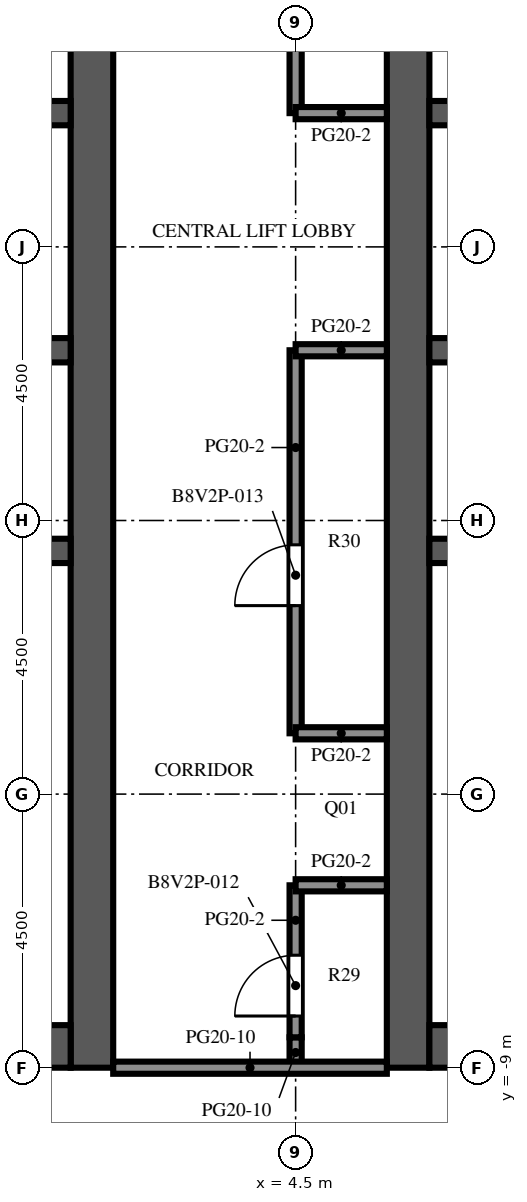
"""IFC4 building model, lengths in metres.
Left out: names, types, materials, properties, quantities, classifications, styles, units other than length and angle.
Written with IfcOpenShell. Run it as: python <this file> out.ifc"""

import sys

from ifc_helpers import new_model, si_unit, direction, frame, frame_2d, origin, place, context, subcontext, project, spatial, rectangle, extrude, element, fill, save


model = new_model("IFC4")
c1 = context("Model", 3, precision=1e-05, world=origin(), true_north=direction((0.0, 1.0)))
c2 = subcontext(c1, "Body", "Model", "MODEL_VIEW")
j1 = project(units=[si_unit("LENGTHUNIT", "METRE"), si_unit("PLANEANGLEUNIT", "RADIAN")], contexts=[c1])
p1 = place(None, origin())
s1 = spatial("IfcSite", under=j1, at=p1, CompositionType="ELEMENT")
p2 = place(p1, origin())
s2 = spatial("IfcBuilding", under=s1, at=p2, CompositionType="ELEMENT")
p3 = place(p2, frame((0.0, 0.0, 290.9)))
s3 = spatial("IfcBuildingStorey", under=s2, at=p3, CompositionType="ELEMENT", Elevation=290.9)
p4 = place(p3, frame((1.15, -9.0, 0.0), z_axis=(0.0, 0.0, 1.0), x_axis=(0.0, 1.0, 0.0)))
e1 = element("IfcWall", 1, at=p4, inside=s3, PredefinedType="SHEAR", context=c2, shape_type="SweptSolid", body=[
    extrude(rectangle(XDim=27.5, YDim=0.7, at=frame_2d((13.75, 0.0))), origin(), (0.0, 0.0, 1.0), 4.1),
])
p5 = place(p4, frame((12.55, 0.0, 0.0)))
e2 = element("IfcOpeningElement", 2, at=p5, cuts=e1, PredefinedType="OPENING", context=c2, shape_type="SweptSolid", body=[
    extrude(rectangle(XDim=2.4, YDim=2.4, at=frame_2d((1.2, 1.2))), frame((0.0, 0.36, 0.0), z_axis=(0.0, -1.0, 0.0), x_axis=(1.0, 0.0, 0.0)), (0.0, 0.0, 1.0), 0.72),
])
p6 = place(p4, frame((3.9, 0.0, 0.0)))
e3 = element("IfcOpeningElement", 3, at=p6, cuts=e1, PredefinedType="OPENING", context=c2, shape_type="SweptSolid", body=[
    extrude(rectangle(XDim=1.2, YDim=2.1, at=frame_2d((0.6, 1.05))), frame((0.0, 0.36, 0.0), z_axis=(0.0, -1.0, 0.0), x_axis=(1.0, 0.0, 0.0)), (0.0, 0.0, 1.0), 0.72),
])
p7 = place(p4, frame((22.4, 0.0, 0.0)))
e4 = element("IfcOpeningElement", 4, at=p7, cuts=e1, PredefinedType="OPENING", context=c2, shape_type="SweptSolid", body=[
    extrude(rectangle(XDim=1.2, YDim=2.1, at=frame_2d((0.6, 1.05))), frame((0.0, 0.36, 0.0), z_axis=(0.0, -1.0, 0.0), x_axis=(1.0, 0.0, 0.0)), (0.0, 0.0, 1.0), 0.72),
])
p8 = place(p3, frame((-9.8, -8.65, 0.0), z_axis=(0.0, 0.0, 1.0), x_axis=(1.0, 0.0, 0.0)))
e5 = element("IfcWall", 5, at=p8, inside=s3, PredefinedType="SHEAR", context=c2, shape_type="SweptSolid", body=[
    extrude(rectangle(XDim=10.6, YDim=0.7, at=frame_2d((5.3, 0.0))), origin(), (0.0, 0.0, 1.0), 4.1),
])
p9 = place(p3, frame((-9.8, -0.5, 0.0), z_axis=(0.0, 0.0, 1.0), x_axis=(1.0, 0.0, 0.0)))
e6 = element("IfcWall", 6, at=p9, inside=s3, PredefinedType="SHEAR", context=c2, shape_type="SweptSolid", body=[
    extrude(rectangle(XDim=10.6, YDim=0.4, at=frame_2d((5.3, 0.0))), origin(), (0.0, 0.0, 1.0), 4.1),
])
p10 = place(p3, frame((-9.8, 2.8, 0.0), z_axis=(0.0, 0.0, 1.0), x_axis=(1.0, 0.0, 0.0)))
e7 = element("IfcWall", 7, at=p10, inside=s3, PredefinedType="SHEAR", context=c2, shape_type="SweptSolid", body=[
    extrude(rectangle(XDim=10.6, YDim=0.4, at=frame_2d((5.3, 0.0))), origin(), (0.0, 0.0, 1.0), 4.1),
])
p11 = place(p10, frame((0.688, 0.0, 0.0)))
e8 = element("IfcOpeningElement", 8, at=p11, cuts=e7, PredefinedType="OPENING", context=c2, shape_type="SweptSolid", body=[
    extrude(rectangle(XDim=1.1, YDim=2.1, at=frame_2d((0.55, 1.05))), frame((0.0, 0.21, 0.0), z_axis=(0.0, -1.0, 0.0), x_axis=(1.0, 0.0, 0.0)), (0.0, 0.0, 1.0), 0.42),
])
p12 = place(p10, frame((3.438, 0.0, 0.0)))
e9 = element("IfcOpeningElement", 9, at=p12, cuts=e7, PredefinedType="OPENING", context=c2, shape_type="SweptSolid", body=[
    extrude(rectangle(XDim=1.1, YDim=2.1, at=frame_2d((0.55, 1.05))), frame((0.0, 0.21, 0.0), z_axis=(0.0, -1.0, 0.0), x_axis=(1.0, 0.0, 0.0)), (0.0, 0.0, 1.0), 0.42),
])
p13 = place(p10, frame((6.113, 0.0, 0.0)))
e10 = element("IfcOpeningElement", 10, at=p13, cuts=e7, PredefinedType="OPENING", context=c2, shape_type="SweptSolid", body=[
    extrude(rectangle(XDim=1.0, YDim=2.1, at=frame_2d((0.5, 1.05))), frame((0.0, 0.21, 0.0), z_axis=(0.0, -1.0, 0.0), x_axis=(1.0, 0.0, 0.0)), (0.0, 0.0, 1.0), 0.42),
])
p14 = place(p10, frame((8.863, 0.0, 0.0)))
e11 = element("IfcOpeningElement", 11, at=p14, cuts=e7, PredefinedType="OPENING", context=c2, shape_type="SweptSolid", body=[
    extrude(rectangle(XDim=1.0, YDim=2.1, at=frame_2d((0.5, 1.05))), frame((0.0, 0.21, 0.0), z_axis=(0.0, -1.0, 0.0), x_axis=(1.0, 0.0, 0.0)), (0.0, 0.0, 1.0), 0.42),
])
p15 = place(p3, frame((-9.8, 6.7, 0.0), z_axis=(0.0, 0.0, 1.0), x_axis=(1.0, 0.0, 0.0)))
e12 = element("IfcWall", 12, at=p15, inside=s3, PredefinedType="SHEAR", context=c2, shape_type="SweptSolid", body=[
    extrude(rectangle(XDim=10.6, YDim=0.4, at=frame_2d((5.3, 0.0))), origin(), (0.0, 0.0, 1.0), 4.1),
])
p16 = place(p15, frame((3.438, 0.0, 0.0)))
e13 = element("IfcOpeningElement", 13, at=p16, cuts=e12, PredefinedType="OPENING", context=c2, shape_type="SweptSolid", body=[
    extrude(rectangle(XDim=1.1, YDim=2.1, at=frame_2d((0.55, 1.05))), frame((0.0, 0.21, 0.0), z_axis=(0.0, -1.0, 0.0), x_axis=(1.0, 0.0, 0.0)), (0.0, 0.0, 1.0), 0.42),
])
p17 = place(p15, frame((6.062, 0.0, 0.0)))
e14 = element("IfcOpeningElement", 14, at=p17, cuts=e12, PredefinedType="OPENING", context=c2, shape_type="SweptSolid", body=[
    extrude(rectangle(XDim=1.1, YDim=2.1, at=frame_2d((0.55, 1.05))), frame((0.0, 0.21, 0.0), z_axis=(0.0, -1.0, 0.0), x_axis=(1.0, 0.0, 0.0)), (0.0, 0.0, 1.0), 0.42),
])
p18 = place(p15, frame((8.812, 0.0, 0.0)))
e15 = element("IfcOpeningElement", 15, at=p18, cuts=e12, PredefinedType="OPENING", context=c2, shape_type="SweptSolid", body=[
    extrude(rectangle(XDim=1.1, YDim=2.1, at=frame_2d((0.55, 1.05))), frame((0.0, 0.21, 0.0), z_axis=(0.0, -1.0, 0.0), x_axis=(1.0, 0.0, 0.0)), (0.0, 0.0, 1.0), 0.42),
])
p19 = place(p15, frame((0.738, 0.0, 0.0)))
e16 = element("IfcOpeningElement", 16, at=p19, cuts=e12, PredefinedType="OPENING", context=c2, shape_type="SweptSolid", body=[
    extrude(rectangle(XDim=1.0, YDim=2.1, at=frame_2d((0.5, 1.05))), frame((0.0, 0.21, 0.0), z_axis=(0.0, -1.0, 0.0), x_axis=(1.0, 0.0, 0.0)), (0.0, 0.0, 1.0), 0.42),
])
p20 = place(p3, frame((6.35, -9.0, 0.0), z_axis=(0.0, 0.0, 1.0), x_axis=(0.0, 1.0, 0.0)))
e17 = element("IfcWall", 17, at=p20, inside=s3, PredefinedType="SHEAR", context=c2, shape_type="SweptSolid", body=[
    extrude(rectangle(XDim=27.5, YDim=0.7, at=frame_2d((13.75, 0.0))), origin(), (0.0, 0.0, 1.0), 4.1),
])
p21 = place(p20, frame((12.55, 0.0, 0.0)))
e18 = element("IfcOpeningElement", 18, at=p21, cuts=e17, PredefinedType="OPENING", context=c2, shape_type="SweptSolid", body=[
    extrude(rectangle(XDim=2.4, YDim=2.4, at=frame_2d((1.2, 1.2))), frame((0.0, 0.36, 0.0), z_axis=(0.0, -1.0, 0.0), x_axis=(1.0, 0.0, 0.0)), (0.0, 0.0, 1.0), 0.72),
])
p22 = place(p20, frame((3.9, 0.0, 0.0)))
e19 = element("IfcOpeningElement", 19, at=p22, cuts=e17, PredefinedType="OPENING", context=c2, shape_type="SweptSolid", body=[
    extrude(rectangle(XDim=1.2, YDim=2.1, at=frame_2d((0.6, 1.05))), frame((0.0, 0.36, 0.0), z_axis=(0.0, -1.0, 0.0), x_axis=(1.0, 0.0, 0.0)), (0.0, 0.0, 1.0), 0.72),
])
p23 = place(p20, frame((22.4, 0.0, 0.0)))
e20 = element("IfcOpeningElement", 20, at=p23, cuts=e17, PredefinedType="OPENING", context=c2, shape_type="SweptSolid", body=[
    extrude(rectangle(XDim=1.2, YDim=2.1, at=frame_2d((0.6, 1.05))), frame((0.0, 0.36, 0.0), z_axis=(0.0, -1.0, 0.0), x_axis=(1.0, 0.0, 0.0)), (0.0, 0.0, 1.0), 0.72),
])
p24 = place(p3, frame((6.7, -8.65, 0.0), z_axis=(0.0, 0.0, 1.0), x_axis=(1.0, 0.0, 0.0)))
e21 = element("IfcWall", 21, at=p24, inside=s3, PredefinedType="SHEAR", context=c2, shape_type="SweptSolid", body=[
    extrude(rectangle(XDim=10.6, YDim=0.7, at=frame_2d((5.3, 0.0))), origin(), (0.0, 0.0, 1.0), 4.1),
])
p25 = place(p3, frame((6.7, -0.5, 0.0), z_axis=(0.0, 0.0, 1.0), x_axis=(1.0, 0.0, 0.0)))
e22 = element("IfcWall", 22, at=p25, inside=s3, PredefinedType="SHEAR", context=c2, shape_type="SweptSolid", body=[
    extrude(rectangle(XDim=10.6, YDim=0.4, at=frame_2d((5.3, 0.0))), origin(), (0.0, 0.0, 1.0), 4.1),
])
p26 = place(p3, frame((6.7, 2.8, 0.0), z_axis=(0.0, 0.0, 1.0), x_axis=(1.0, 0.0, 0.0)))
e23 = element("IfcWall", 23, at=p26, inside=s3, PredefinedType="SHEAR", context=c2, shape_type="SweptSolid", body=[
    extrude(rectangle(XDim=10.6, YDim=0.4, at=frame_2d((5.3, 0.0))), origin(), (0.0, 0.0, 1.0), 4.1),
])
p27 = place(p26, frame((0.688, 0.0, 0.0)))
e24 = element("IfcOpeningElement", 24, at=p27, cuts=e23, PredefinedType="OPENING", context=c2, shape_type="SweptSolid", body=[
    extrude(rectangle(XDim=1.1, YDim=2.1, at=frame_2d((0.55, 1.05))), frame((0.0, 0.21, 0.0), z_axis=(0.0, -1.0, 0.0), x_axis=(1.0, 0.0, 0.0)), (0.0, 0.0, 1.0), 0.42),
])
p28 = place(p26, frame((3.438, 0.0, 0.0)))
e25 = element("IfcOpeningElement", 25, at=p28, cuts=e23, PredefinedType="OPENING", context=c2, shape_type="SweptSolid", body=[
    extrude(rectangle(XDim=1.1, YDim=2.1, at=frame_2d((0.55, 1.05))), frame((0.0, 0.21, 0.0), z_axis=(0.0, -1.0, 0.0), x_axis=(1.0, 0.0, 0.0)), (0.0, 0.0, 1.0), 0.42),
])
p29 = place(p26, frame((6.113, 0.0, 0.0)))
e26 = element("IfcOpeningElement", 26, at=p29, cuts=e23, PredefinedType="OPENING", context=c2, shape_type="SweptSolid", body=[
    extrude(rectangle(XDim=1.0, YDim=2.1, at=frame_2d((0.5, 1.05))), frame((0.0, 0.21, 0.0), z_axis=(0.0, -1.0, 0.0), x_axis=(1.0, 0.0, 0.0)), (0.0, 0.0, 1.0), 0.42),
])
p30 = place(p26, frame((8.863, 0.0, 0.0)))
e27 = element("IfcOpeningElement", 27, at=p30, cuts=e23, PredefinedType="OPENING", context=c2, shape_type="SweptSolid", body=[
    extrude(rectangle(XDim=1.0, YDim=2.1, at=frame_2d((0.5, 1.05))), frame((0.0, 0.21, 0.0), z_axis=(0.0, -1.0, 0.0), x_axis=(1.0, 0.0, 0.0)), (0.0, 0.0, 1.0), 0.42),
])
p31 = place(p3, frame((6.7, 6.7, 0.0), z_axis=(0.0, 0.0, 1.0), x_axis=(1.0, 0.0, 0.0)))
e28 = element("IfcWall", 28, at=p31, inside=s3, PredefinedType="SHEAR", context=c2, shape_type="SweptSolid", body=[
    extrude(rectangle(XDim=10.6, YDim=0.4, at=frame_2d((5.3, 0.0))), origin(), (0.0, 0.0, 1.0), 4.1),
])
p32 = place(p31, frame((3.438, 0.0, 0.0)))
e29 = element("IfcOpeningElement", 29, at=p32, cuts=e28, PredefinedType="OPENING", context=c2, shape_type="SweptSolid", body=[
    extrude(rectangle(XDim=1.1, YDim=2.1, at=frame_2d((0.55, 1.05))), frame((0.0, 0.21, 0.0), z_axis=(0.0, -1.0, 0.0), x_axis=(1.0, 0.0, 0.0)), (0.0, 0.0, 1.0), 0.42),
])
p33 = place(p31, frame((6.062, 0.0, 0.0)))
e30 = element("IfcOpeningElement", 30, at=p33, cuts=e28, PredefinedType="OPENING", context=c2, shape_type="SweptSolid", body=[
    extrude(rectangle(XDim=1.1, YDim=2.1, at=frame_2d((0.55, 1.05))), frame((0.0, 0.21, 0.0), z_axis=(0.0, -1.0, 0.0), x_axis=(1.0, 0.0, 0.0)), (0.0, 0.0, 1.0), 0.42),
])
p34 = place(p31, frame((8.812, 0.0, 0.0)))
e31 = element("IfcOpeningElement", 31, at=p34, cuts=e28, PredefinedType="OPENING", context=c2, shape_type="SweptSolid", body=[
    extrude(rectangle(XDim=1.1, YDim=2.1, at=frame_2d((0.55, 1.05))), frame((0.0, 0.21, 0.0), z_axis=(0.0, -1.0, 0.0), x_axis=(1.0, 0.0, 0.0)), (0.0, 0.0, 1.0), 0.42),
])
p35 = place(p31, frame((0.738, 0.0, 0.0)))
e32 = element("IfcOpeningElement", 32, at=p35, cuts=e28, PredefinedType="OPENING", context=c2, shape_type="SweptSolid", body=[
    extrude(rectangle(XDim=1.0, YDim=2.1, at=frame_2d((0.5, 1.05))), frame((0.0, 0.21, 0.0), z_axis=(0.0, -1.0, 0.0), x_axis=(1.0, 0.0, 0.0)), (0.0, 0.0, 1.0), 0.42),
])
p36 = place(p3, frame((4.5, -9.0, 0.0), z_axis=(0.0, 0.0, 1.0), x_axis=(0.0, 1.0, 0.0)))
e33 = element("IfcWall", 33, at=p36, inside=s3, PredefinedType="PARTITIONING", context=c2, shape_type="SweptSolid", body=[
    extrude(rectangle(XDim=0.5, YDim=0.2, at=frame_2d((0.25, 0.0))), origin(), (0.0, 0.0, 1.0), 1.47),
])
p37 = place(p3, frame((4.5, -6.0, 0.0), z_axis=(0.0, 0.0, 1.0), x_axis=(0.0, -1.0, 0.0)))
e34 = element("IfcWall", 34, at=p37, inside=s3, PredefinedType="PARTITIONING", context=c2, shape_type="SweptSolid", body=[
    extrude(rectangle(XDim=2.5, YDim=0.2, at=frame_2d((1.25, 0.0))), origin(), (0.0, 0.0, 1.0), 3.5),
])
p38 = place(p37, frame((1.15, 0.0, 0.0)))
e35 = element("IfcOpeningElement", 35, at=p38, cuts=e34, PredefinedType="OPENING", context=c2, shape_type="SweptSolid", body=[
    extrude(rectangle(XDim=1.0, YDim=2.1, at=frame_2d((0.5, 1.05))), frame((0.0, 0.11, 0.0), z_axis=(0.0, -1.0, 0.0), x_axis=(1.0, 0.0, 0.0)), (0.0, 0.0, 1.0), 0.22),
])
p39 = place(p3, frame((4.5, 2.8, 0.0), z_axis=(0.0, 0.0, 1.0), x_axis=(0.0, -1.0, 0.0)))
e36 = element("IfcWall", 36, at=p39, inside=s3, PredefinedType="PARTITIONING", context=c2, shape_type="SweptSolid", body=[
    extrude(rectangle(XDim=6.3, YDim=0.2, at=frame_2d((3.15, 0.0))), origin(), (0.0, 0.0, 1.0), 3.5),
])
p40 = place(p39, frame((3.2, 0.0, 0.0)))
e37 = element("IfcOpeningElement", 37, at=p40, cuts=e36, PredefinedType="OPENING", context=c2, shape_type="SweptSolid", body=[
    extrude(rectangle(XDim=1.0, YDim=2.1, at=frame_2d((0.5, 1.05))), frame((0.0, 0.11, 0.0), z_axis=(0.0, -1.0, 0.0), x_axis=(1.0, 0.0, 0.0)), (0.0, 0.0, 1.0), 0.22),
])
p41 = place(p3, frame((4.5, 18.5, 0.0), z_axis=(0.0, 0.0, 1.0), x_axis=(0.0, -1.0, 0.0)))
e38 = element("IfcWall", 38, at=p41, inside=s3, PredefinedType="PARTITIONING", context=c2, shape_type="SweptSolid", body=[
    extrude(rectangle(XDim=11.8, YDim=0.2, at=frame_2d((5.9, 0.0))), origin(), (0.0, 0.0, 1.0), 3.5),
])
p42 = place(p41, frame((3.95, 0.0, 0.0)))
e39 = element("IfcOpeningElement", 39, at=p42, cuts=e38, PredefinedType="OPENING", context=c2, shape_type="SweptSolid", body=[
    extrude(rectangle(XDim=1.0, YDim=2.1, at=frame_2d((0.5, 1.05))), frame((0.0, 0.11, 0.0), z_axis=(0.0, -1.0, 0.0), x_axis=(1.0, 0.0, 0.0)), (0.0, 0.0, 1.0), 0.22),
])
p43 = place(p3, frame((1.5, -9.0, 0.0), z_axis=(0.0, 0.0, 1.0), x_axis=(1.0, 0.0, 0.0)))
e40 = element("IfcWall", 40, at=p43, inside=s3, PredefinedType="PARTITIONING", context=c2, shape_type="SweptSolid", body=[
    extrude(rectangle(XDim=4.5, YDim=0.2, at=frame_2d((2.25, 0.0))), origin(), (0.0, 0.0, 1.0), 1.47),
])
for number, where, z_axis, x_axis in (
    (41, (4.5, -6.0, 0.0), (0.0, 0.0, 1.0), (1.0, 0.0, 0.0)),
    (42, (4.5, -3.5, 0.0), (0.0, 0.0, 1.0), (1.0, 0.0, 0.0)),
    (43, (4.5, 2.8, 0.0), (0.0, 0.0, 1.0), (1.0, 0.0, 0.0)),
    (44, (4.5, 6.7, 0.0), (0.0, 0.0, 1.0), (1.0, 0.0, 0.0)),
):
    element("IfcWall", number, at=place(p3, frame(where, z_axis=z_axis, x_axis=x_axis)), inside=s3, PredefinedType="PARTITIONING", context=c2, shape_type="SweptSolid", body=[
        extrude(rectangle(XDim=1.5, YDim=0.2, at=frame_2d((0.75, 0.0))), origin(), (0.0, 0.0, 1.0), 3.5),
    ])
p44 = place(p5, origin())
e45 = element("IfcDoor", 45, at=p44, inside=s3, OperationType="DOUBLE_DOOR_DOUBLE_SWING", PredefinedType="DOOR", context=c2, shape_type="SweptSolid", body=[
    extrude(rectangle(XDim=2.4, YDim=2.4, at=frame_2d((1.2, 1.2))), frame((0.0, 0.025, 0.0), z_axis=(0.0, -1.0, 0.0), x_axis=(1.0, 0.0, 0.0)), (0.0, 0.0, 1.0), 0.05),
])
fill(e2, e45)
p45 = place(p21, origin())
e46 = element("IfcDoor", 46, at=p45, inside=s3, OperationType="DOUBLE_DOOR_DOUBLE_SWING", PredefinedType="DOOR", context=c2, shape_type="SweptSolid", body=[
    extrude(rectangle(XDim=2.4, YDim=2.4, at=frame_2d((1.2, 1.2))), frame((0.0, 0.025, 0.0), z_axis=(0.0, -1.0, 0.0), x_axis=(1.0, 0.0, 0.0)), (0.0, 0.0, 1.0), 0.05),
])
fill(e18, e46)
p46 = place(p6, origin())
e47 = element("IfcDoor", 47, at=p46, inside=s3, OperationType="SINGLE_SWING_LEFT", PredefinedType="DOOR", context=c2, shape_type="SweptSolid", body=[
    extrude(rectangle(XDim=1.2, YDim=2.1, at=frame_2d((0.6, 1.05))), frame((0.0, 0.325, 0.0), z_axis=(0.0, -1.0, 0.0), x_axis=(1.0, 0.0, 0.0)), (0.0, 0.0, 1.0), 0.05),
])
fill(e3, e47)
p47 = place(p22, origin())
e48 = element("IfcDoor", 48, at=p47, inside=s3, OperationType="SINGLE_SWING_RIGHT", PredefinedType="DOOR", context=c2, shape_type="SweptSolid", body=[
    extrude(rectangle(XDim=1.2, YDim=2.1, at=frame_2d((0.6, 1.05))), frame((0.0, -0.275, 0.0), z_axis=(0.0, -1.0, 0.0), x_axis=(1.0, 0.0, 0.0)), (0.0, 0.0, 1.0), 0.05),
])
fill(e19, e48)
p48 = place(p38, origin())
e49 = element("IfcDoor", 49, at=p48, inside=s3, OperationType="SINGLE_SWING_RIGHT", PredefinedType="DOOR", context=c2, shape_type="SweptSolid", body=[
    extrude(rectangle(XDim=1.0, YDim=2.1, at=frame_2d((0.5, 1.05))), frame((0.0, 0.025, 0.0), z_axis=(0.0, -1.0, 0.0), x_axis=(1.0, 0.0, 0.0)), (0.0, 0.0, 1.0), 0.05),
])
fill(e35, e49)
p49 = place(p40, origin())
e50 = element("IfcDoor", 50, at=p49, inside=s3, OperationType="SINGLE_SWING_RIGHT", PredefinedType="DOOR", context=c2, shape_type="SweptSolid", body=[
    extrude(rectangle(XDim=1.0, YDim=2.1, at=frame_2d((0.5, 1.05))), frame((0.0, 0.025, 0.0), z_axis=(0.0, -1.0, 0.0), x_axis=(1.0, 0.0, 0.0)), (0.0, 0.0, 1.0), 0.05),
])
fill(e37, e50)
save(model, sys.argv[1])
